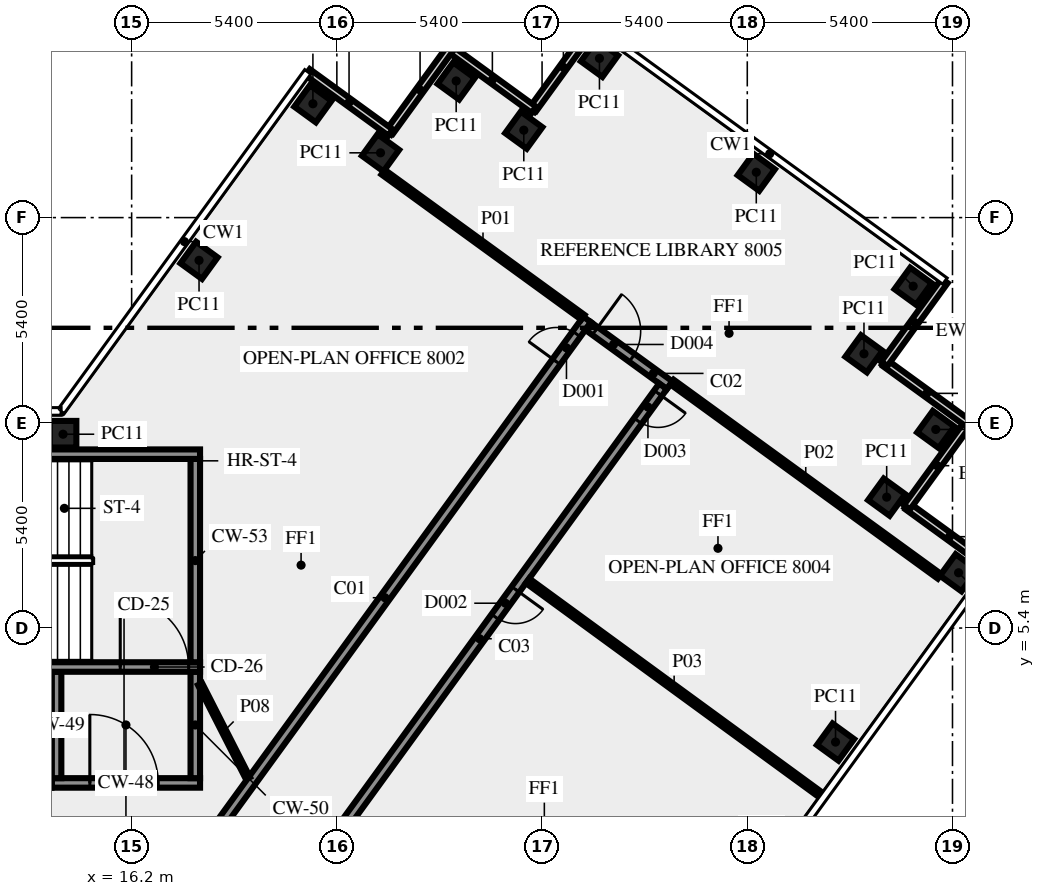
"""IFC4 building model, lengths in metres.
Left out: names, types, materials, properties, quantities, classifications, styles, units other than length and angle.
Written with IfcOpenShell. Run it as: python <this file> out.ifc"""

import sys

from ifc_helpers import new_model, si_unit, direction, frame, frame_2d, origin, origin_2d, place, context, subcontext, project, spatial, rectangle, extrude, element, fill, save


model = new_model("IFC4")
c1 = context("Model", 3, precision=1e-05, world=origin(), true_north=direction((0.0, 1.0)))
c2 = subcontext(c1, "Body", "Model", "MODEL_VIEW")
j1 = project(units=[si_unit("LENGTHUNIT", "METRE"), si_unit("PLANEANGLEUNIT", "RADIAN")], contexts=[c1])
p1 = place(None, origin())
s1 = spatial("IfcSite", under=j1, at=p1, CompositionType="ELEMENT")
p2 = place(p1, origin())
s2 = spatial("IfcBuilding", under=s1, at=p2, CompositionType="ELEMENT")
p3 = place(p2, frame((0.0, 0.0, 343.0)))
s3 = spatial("IfcBuildingStorey", under=s2, at=p3, CompositionType="ELEMENT", Elevation=343.0)
for number, where, z_axis, x_axis in (
    (1, (34.722, 2.4, 0.0), (0.0, 0.0, 1.0), (0.588, 0.809, 0.0)),
    (2, (37.96, 6.855, 0.0), (0.0, 0.0, 1.0), (0.588, 0.809, 0.0)),
    (3, (36.068, 8.844, 0.0), (0.0, 0.0, 1.0), (0.588, 0.809, 0.0)),
    (4, (37.36, 10.625, 0.0), (0.0, 0.0, 1.0), (0.588, 0.809, 0.0)),
    (5, (35.471, 12.616, 0.0), (0.0, 0.0, 1.0), (-0.809, 0.588, 0.0)),
    (6, (36.765, 14.395, 0.0), (0.0, 0.0, 1.0), (-0.809, 0.588, 0.0)),
    (7, (32.637, 17.393, 0.0), (0.0, 0.0, 1.0), (-0.809, 0.588, 0.0)),
    (8, (28.51, 20.39, 0.0), (0.0, 0.0, 1.0), (-0.588, -0.809, 0.0)),
    (9, (26.519, 18.5, 0.0), (0.0, 0.0, 1.0), (-0.809, 0.588, 0.0)),
    (10, (24.74, 19.795, 0.0), (0.0, 0.0, 1.0), (-0.588, -0.809, 0.0)),
    (11, (22.749, 17.904, 0.0), (0.0, 0.0, 1.0), (-0.588, -0.809, 0.0)),
    (12, (20.97, 19.195, 0.0), (0.0, 0.0, 1.0), (-0.588, -0.809, 0.0)),
    (13, (17.974, 15.075, 0.0), (0.0, 0.0, 1.0), (-0.588, -0.809, 0.0)),
    (14, (14.395, 10.5, 0.0), (0.0, 0.0, 1.0), (-1.0, 0.0, 0.0)),
):
    element("IfcColumn", number, at=place(p3, frame(where, z_axis=z_axis, x_axis=x_axis)), inside=s3, PredefinedType="COLUMN", context=c2, shape_type="SweptSolid", body=[
        extrude(rectangle(XDim=0.7, YDim=0.7, at=origin_2d()), origin(), (0.0, 0.0, 1.0), 3.65),
    ])
for number, where, z_axis, x_axis in (
    (15, (38.814, 7.01, 0.0), (0.0, 0.0, 1.0), (-0.809, 0.588, 0.0)),
    (16, (36.602, 8.58, 0.0), (0.0, 0.0, 1.0), (0.588, 0.809, 0.0)),
    (17, (38.216, 10.782, 0.0), (0.0, 0.0, 1.0), (-0.809, 0.588, 0.0)),
    (18, (36.005, 12.352, 0.0), (0.0, 0.0, 1.0), (0.588, 0.809, 0.0)),
):
    element("IfcWall", number, at=place(p3, frame(where, z_axis=z_axis, x_axis=x_axis)), inside=s3, PredefinedType="SOLIDWALL", context=c2, shape_type="SweptSolid", body=[
        extrude(rectangle(XDim=2.7, YDim=0.2, at=frame_2d((1.35, 0.0))), origin(), (0.0, 0.0, 1.0), 3.65),
    ])
for number, where, z_axis, x_axis in (
    (19, (28.354, 21.247, 0.0), (0.0, 0.0, 1.0), (-0.588, -0.809, 0.0)),
    (20, (26.785, 19.036, 0.0), (0.0, 0.0, 1.0), (-0.809, 0.588, 0.0)),
):
    element("IfcWall", number, at=place(p3, frame(where, z_axis=z_axis, x_axis=x_axis)), inside=s3, PredefinedType="SOLIDWALL", context=c2, shape_type="SweptSolid", body=[
        extrude(rectangle(XDim=2.7, YDim=0.2, at=frame_2d((1.35, 0.0))), origin(), (0.0, 0.0, 1.0), 3.65),
    ])
for number, where, z_axis, x_axis in (
    (21, (24.583, 20.65, 0.0), (0.0, 0.0, 1.0), (-0.588, -0.809, 0.0)),
    (22, (23.013, 18.438, 0.0), (0.0, 0.0, 1.0), (-0.809, 0.588, 0.0)),
):
    element("IfcWall", number, at=place(p3, frame(where, z_axis=z_axis, x_axis=x_axis)), inside=s3, PredefinedType="SOLIDWALL", context=c2, shape_type="SweptSolid", body=[
        extrude(rectangle(XDim=2.7, YDim=0.2, at=frame_2d((1.35, 0.0))), origin(), (0.0, 0.0, 1.0), 3.65),
    ])
p4 = place(p3, frame((14.1, 1.325, 0.0), z_axis=(0.0, 0.0, 1.0), x_axis=(1.0, 0.0, 0.0)))
e23 = element("IfcWall", 23, at=p4, inside=s3, PredefinedType="SHEAR", context=c2, shape_type="SweptSolid", body=[
    extrude(rectangle(XDim=3.9, YDim=0.25, at=frame_2d((1.95, 0.0))), origin(), (0.0, 0.0, 1.0), 3.65),
])
p5 = place(p4, frame((1.0, 0.0, 0.0)))
e24 = element("IfcOpeningElement", 24, at=p5, cuts=e23, PredefinedType="OPENING", context=c2, shape_type="SweptSolid", body=[
    extrude(rectangle(XDim=1.8, YDim=2.1, at=frame_2d((0.9, 1.05))), frame((0.0, 0.135, 0.0), z_axis=(0.0, -1.0, 0.0), x_axis=(1.0, 0.0, 0.0)), (0.0, 0.0, 1.0), 0.27),
])
for number, where, z_axis, x_axis in (
    (25, (14.225, 1.45, 0.0), (0.0, 0.0, 1.0), (0.0, 1.0, 0.0)),
    (26, (17.875, 1.45, 0.0), (0.0, 0.0, 1.0), (0.0, 1.0, 0.0)),
):
    element("IfcWall", number, at=place(p3, frame(where, z_axis=z_axis, x_axis=x_axis)), inside=s3, PredefinedType="SHEAR", context=c2, shape_type="SweptSolid", body=[
        extrude(rectangle(XDim=2.8, YDim=0.25, at=frame_2d((1.4, 0.0))), origin(), (0.0, 0.0, 1.0), 3.65),
    ])
p6 = place(p3, frame((7.5, 4.375, 0.0), z_axis=(0.0, 0.0, 1.0), x_axis=(1.0, 0.0, 0.0)))
e27 = element("IfcWall", 27, at=p6, inside=s3, PredefinedType="SHEAR", context=c2, shape_type="SweptSolid", body=[
    extrude(rectangle(XDim=10.5, YDim=0.25, at=frame_2d((5.25, 0.0))), origin(), (0.0, 0.0, 1.0), 3.65),
])
p7 = place(p6, frame((8.4, 0.0, 0.0)))
e28 = element("IfcOpeningElement", 28, at=p7, cuts=e27, PredefinedType="OPENING", context=c2, shape_type="SweptSolid", body=[
    extrude(rectangle(XDim=1.8, YDim=2.1, at=frame_2d((0.9, 1.05))), frame((0.0, 0.135, 0.0), z_axis=(0.0, -1.0, 0.0), x_axis=(1.0, 0.0, 0.0)), (0.0, 0.0, 1.0), 0.27),
])
p8 = place(p3, frame((17.875, 4.5, 0.0), z_axis=(0.0, 0.0, 1.0), x_axis=(0.0, 1.0, 0.0)))
e29 = element("IfcWall", 29, at=p8, inside=s3, PredefinedType="SHEAR", context=c2, shape_type="SweptSolid", body=[
    extrude(rectangle(XDim=5.35, YDim=0.25, at=frame_2d((2.675, 0.0))), origin(), (0.0, 0.0, 1.0), 3.65),
])
p9 = place(p3, frame((7.5, 9.975, 0.0), z_axis=(0.0, 0.0, 1.0), x_axis=(1.0, 0.0, 0.0)))
e30 = element("IfcWall", 30, at=p9, inside=s3, PredefinedType="SHEAR", context=c2, shape_type="SweptSolid", body=[
    extrude(rectangle(XDim=10.5, YDim=0.25, at=frame_2d((5.25, 0.0))), origin(), (0.0, 0.0, 1.0), 3.65),
])
p10 = place(p9, frame((2.0, 0.0, 1.0)))
e31 = element("IfcOpeningElement", 31, at=p10, cuts=e30, PredefinedType="OPENING", context=c2, shape_type="SweptSolid", body=[
    extrude(rectangle(XDim=1.2, YDim=1.2, at=frame_2d((0.6, 0.6))), frame((0.0, 0.135, 0.0), z_axis=(0.0, -1.0, 0.0), x_axis=(1.0, 0.0, 0.0)), (0.0, 0.0, 1.0), 0.27),
])
p11 = place(p3, frame((17.545, -1.125, 0.0), z_axis=(0.0, 0.0, 1.0), x_axis=(0.58779555165, 0.809009511354, 0.0)))
e32 = element("IfcWall", 32, at=p11, inside=s3, PredefinedType="SOLIDWALL", context=c2, shape_type="SweptSolid", body=[
    extrude(rectangle(XDim=18.103, YDim=0.25, at=frame_2d((9.052, 0.0))), origin(), (0.0, 0.0, 1.0), 3.65),
])
p12 = place(p11, frame((16.728, 0.0, 0.0)))
e33 = element("IfcOpeningElement", 33, at=p12, cuts=e32, PredefinedType="OPENING", context=c2, shape_type="SweptSolid", body=[
    extrude(rectangle(XDim=0.9, YDim=2.1, at=frame_2d((0.45, 1.05))), frame((0.0, 0.135, 0.0), z_axis=(0.0, -1.0, 0.0), x_axis=(1.0, 0.0, 0.0)), (0.0, 0.0, 1.0), 0.27),
])
p13 = place(p3, frame((28.213, 13.346, 0.0), z_axis=(0.0, 0.0, 1.0), x_axis=(0.809006914995, -0.587799125119, 0.0)))
e34 = element("IfcWall", 34, at=p13, inside=s3, PredefinedType="SOLIDWALL", context=c2, shape_type="SweptSolid", body=[
    extrude(rectangle(XDim=2.65, YDim=0.25, at=frame_2d((1.325, 0.0))), origin(), (0.0, 0.0, 1.0), 3.65),
])
p14 = place(p13, frame((0.225, 0.0, 0.0)))
e35 = element("IfcOpeningElement", 35, at=p14, cuts=e34, PredefinedType="OPENING", context=c2, shape_type="SweptSolid", body=[
    extrude(rectangle(XDim=1.2, YDim=2.1, at=frame_2d((0.6, 1.05))), frame((0.0, 0.135, 0.0), z_axis=(0.0, -1.0, 0.0), x_axis=(1.0, 0.0, 0.0)), (0.0, 0.0, 1.0), 0.27),
])
p15 = place(p3, frame((30.183, 11.761, 0.0), z_axis=(0.0, 0.0, 1.0), x_axis=(-0.587781762867, -0.80901952958, 0.0)))
e36 = element("IfcWall", 36, at=p15, inside=s3, PredefinedType="SOLIDWALL", context=c2, shape_type="SweptSolid", body=[
    extrude(rectangle(XDim=16.42, YDim=0.25, at=frame_2d((8.21, 0.0))), origin(), (0.0, 0.0, 1.0), 3.65),
])
p16 = place(p15, frame((0.225, 0.0, 0.0)))
e37 = element("IfcOpeningElement", 37, at=p16, cuts=e36, PredefinedType="OPENING", context=c2, shape_type="SweptSolid", body=[
    extrude(rectangle(XDim=0.9, YDim=2.1, at=frame_2d((0.45, 1.05))), frame((0.0, 0.135, 0.0), z_axis=(0.0, -1.0, 0.0), x_axis=(1.0, 0.0, 0.0)), (0.0, 0.0, 1.0), 0.27),
])
p17 = place(p15, frame((6.605, 0.0, 0.0)))
e38 = element("IfcOpeningElement", 38, at=p17, cuts=e36, PredefinedType="OPENING", context=c2, shape_type="SweptSolid", body=[
    extrude(rectangle(XDim=0.9, YDim=2.1, at=frame_2d((0.45, 1.05))), frame((0.0, 0.135, 0.0), z_axis=(0.0, -1.0, 0.0), x_axis=(1.0, 0.0, 0.0)), (0.0, 0.0, 1.0), 0.27),
])
p18 = place(p3, frame((28.073, 13.578, 0.0), z_axis=(0.0, 0.0, 1.0), x_axis=(-0.809000932727, 0.587807358619, 0.0)))
e39 = element("IfcWall", 39, at=p18, inside=s3, PredefinedType="PARTITIONING", context=c2, shape_type="SweptSolid", body=[
    extrude(rectangle(XDim=6.496, YDim=0.15, at=frame_2d((3.248, 0.0))), origin(), (0.0, 0.0, 1.0), 3.65),
])
p19 = place(p3, frame((37.458, 6.76, 0.0), z_axis=(0.0, 0.0, 1.0), x_axis=(-0.809016295501, 0.587786214209, 0.0)))
e40 = element("IfcWall", 40, at=p19, inside=s3, PredefinedType="PARTITIONING", context=c2, shape_type="SweptSolid", body=[
    extrude(rectangle(XDim=8.7, YDim=0.15, at=frame_2d((4.35, 0.0))), origin(), (0.0, 0.0, 1.0), 3.65),
])
p20 = place(p3, frame((26.619, 6.643, 0.0), z_axis=(0.0, 0.0, 1.0), x_axis=(0.807594822539, -0.589737740532, 0.0)))
e41 = element("IfcWall", 41, at=p20, inside=s3, PredefinedType="PARTITIONING", context=c2, shape_type="SweptSolid", body=[
    extrude(rectangle(XDim=9.55, YDim=0.15, at=frame_2d((4.775, 0.0))), origin(), (0.0, 0.0, 1.0), 2.95),
])
p21 = place(p3, frame((18.0, 3.925, 0.0), z_axis=(0.0, 0.0, 1.0), x_axis=(0.453950796792, -0.891026752736, 0.0)))
e42 = element("IfcWall", 42, at=p21, inside=s3, PredefinedType="PARTITIONING", context=c2, shape_type="SweptSolid", body=[
    extrude(rectangle(XDim=2.778, YDim=0.12, at=frame_2d((1.389, 0.0))), origin(), (0.0, 0.0, 1.0), 3.65),
])
p22 = place(p5, origin())
e43 = element("IfcDoor", 43, at=p22, inside=s3, OperationType="DOUBLE_DOOR_SINGLE_SWING", PredefinedType="DOOR", context=c2, shape_type="SweptSolid", body=[
    extrude(rectangle(XDim=1.8, YDim=2.1, at=frame_2d((0.9, 1.05))), frame((0.0, 0.025, 0.0), z_axis=(0.0, -1.0, 0.0), x_axis=(1.0, 0.0, 0.0)), (0.0, 0.0, 1.0), 0.05),
])
fill(e24, e43)
p23 = place(p7, origin())
e44 = element("IfcDoor", 44, at=p23, inside=s3, OperationType="DOUBLE_DOOR_SINGLE_SWING", PredefinedType="DOOR", context=c2, shape_type="SweptSolid", body=[
    extrude(rectangle(XDim=1.8, YDim=2.1, at=frame_2d((0.9, 1.05))), frame((0.0, 0.025, 0.0), z_axis=(0.0, -1.0, 0.0), x_axis=(1.0, 0.0, 0.0)), (0.0, 0.0, 1.0), 0.05),
])
fill(e28, e44)
p24 = place(p12, origin())
e45 = element("IfcDoor", 45, at=p24, inside=s3, OperationType="SINGLE_SWING_RIGHT", PredefinedType="DOOR", context=c2, shape_type="SweptSolid", body=[
    extrude(rectangle(XDim=0.9, YDim=2.1, at=frame_2d((0.45, 1.05))), frame((0.0, 0.025, 0.0), z_axis=(0.0, -1.0, 0.0), x_axis=(1.0, 0.0, 0.0)), (0.0, 0.0, 1.0), 0.05),
])
fill(e33, e45)
p25 = place(p16, origin())
e46 = element("IfcDoor", 46, at=p25, inside=s3, OperationType="SINGLE_SWING_LEFT", PredefinedType="DOOR", context=c2, shape_type="SweptSolid", body=[
    extrude(rectangle(XDim=0.9, YDim=2.1, at=frame_2d((0.45, 1.05))), frame((0.0, 0.025, 0.0), z_axis=(0.0, -1.0, 0.0), x_axis=(1.0, 0.0, 0.0)), (0.0, 0.0, 1.0), 0.05),
])
fill(e37, e46)
p26 = place(p14, origin())
e47 = element("IfcDoor", 47, at=p26, inside=s3, OperationType="SINGLE_SWING_LEFT", PredefinedType="DOOR", context=c2, shape_type="SweptSolid", body=[
    extrude(rectangle(XDim=1.2, YDim=2.1, at=frame_2d((0.6, 1.05))), frame((0.0, 0.025, 0.0), z_axis=(0.0, -1.0, 0.0), x_axis=(1.0, 0.0, 0.0)), (0.0, 0.0, 1.0), 0.05),
])
fill(e35, e47)
p27 = place(p17, origin())
e48 = element("IfcDoor", 48, at=p27, inside=s3, OperationType="SINGLE_SWING_LEFT", PredefinedType="DOOR", context=c2, shape_type="SweptSolid", body=[
    extrude(rectangle(XDim=0.9, YDim=2.1, at=frame_2d((0.45, 1.05))), frame((0.0, 0.025, 0.0), z_axis=(0.0, -1.0, 0.0), x_axis=(1.0, 0.0, 0.0)), (0.0, 0.0, 1.0), 0.05),
])
fill(e38, e48)
save(model, sys.argv[1])
